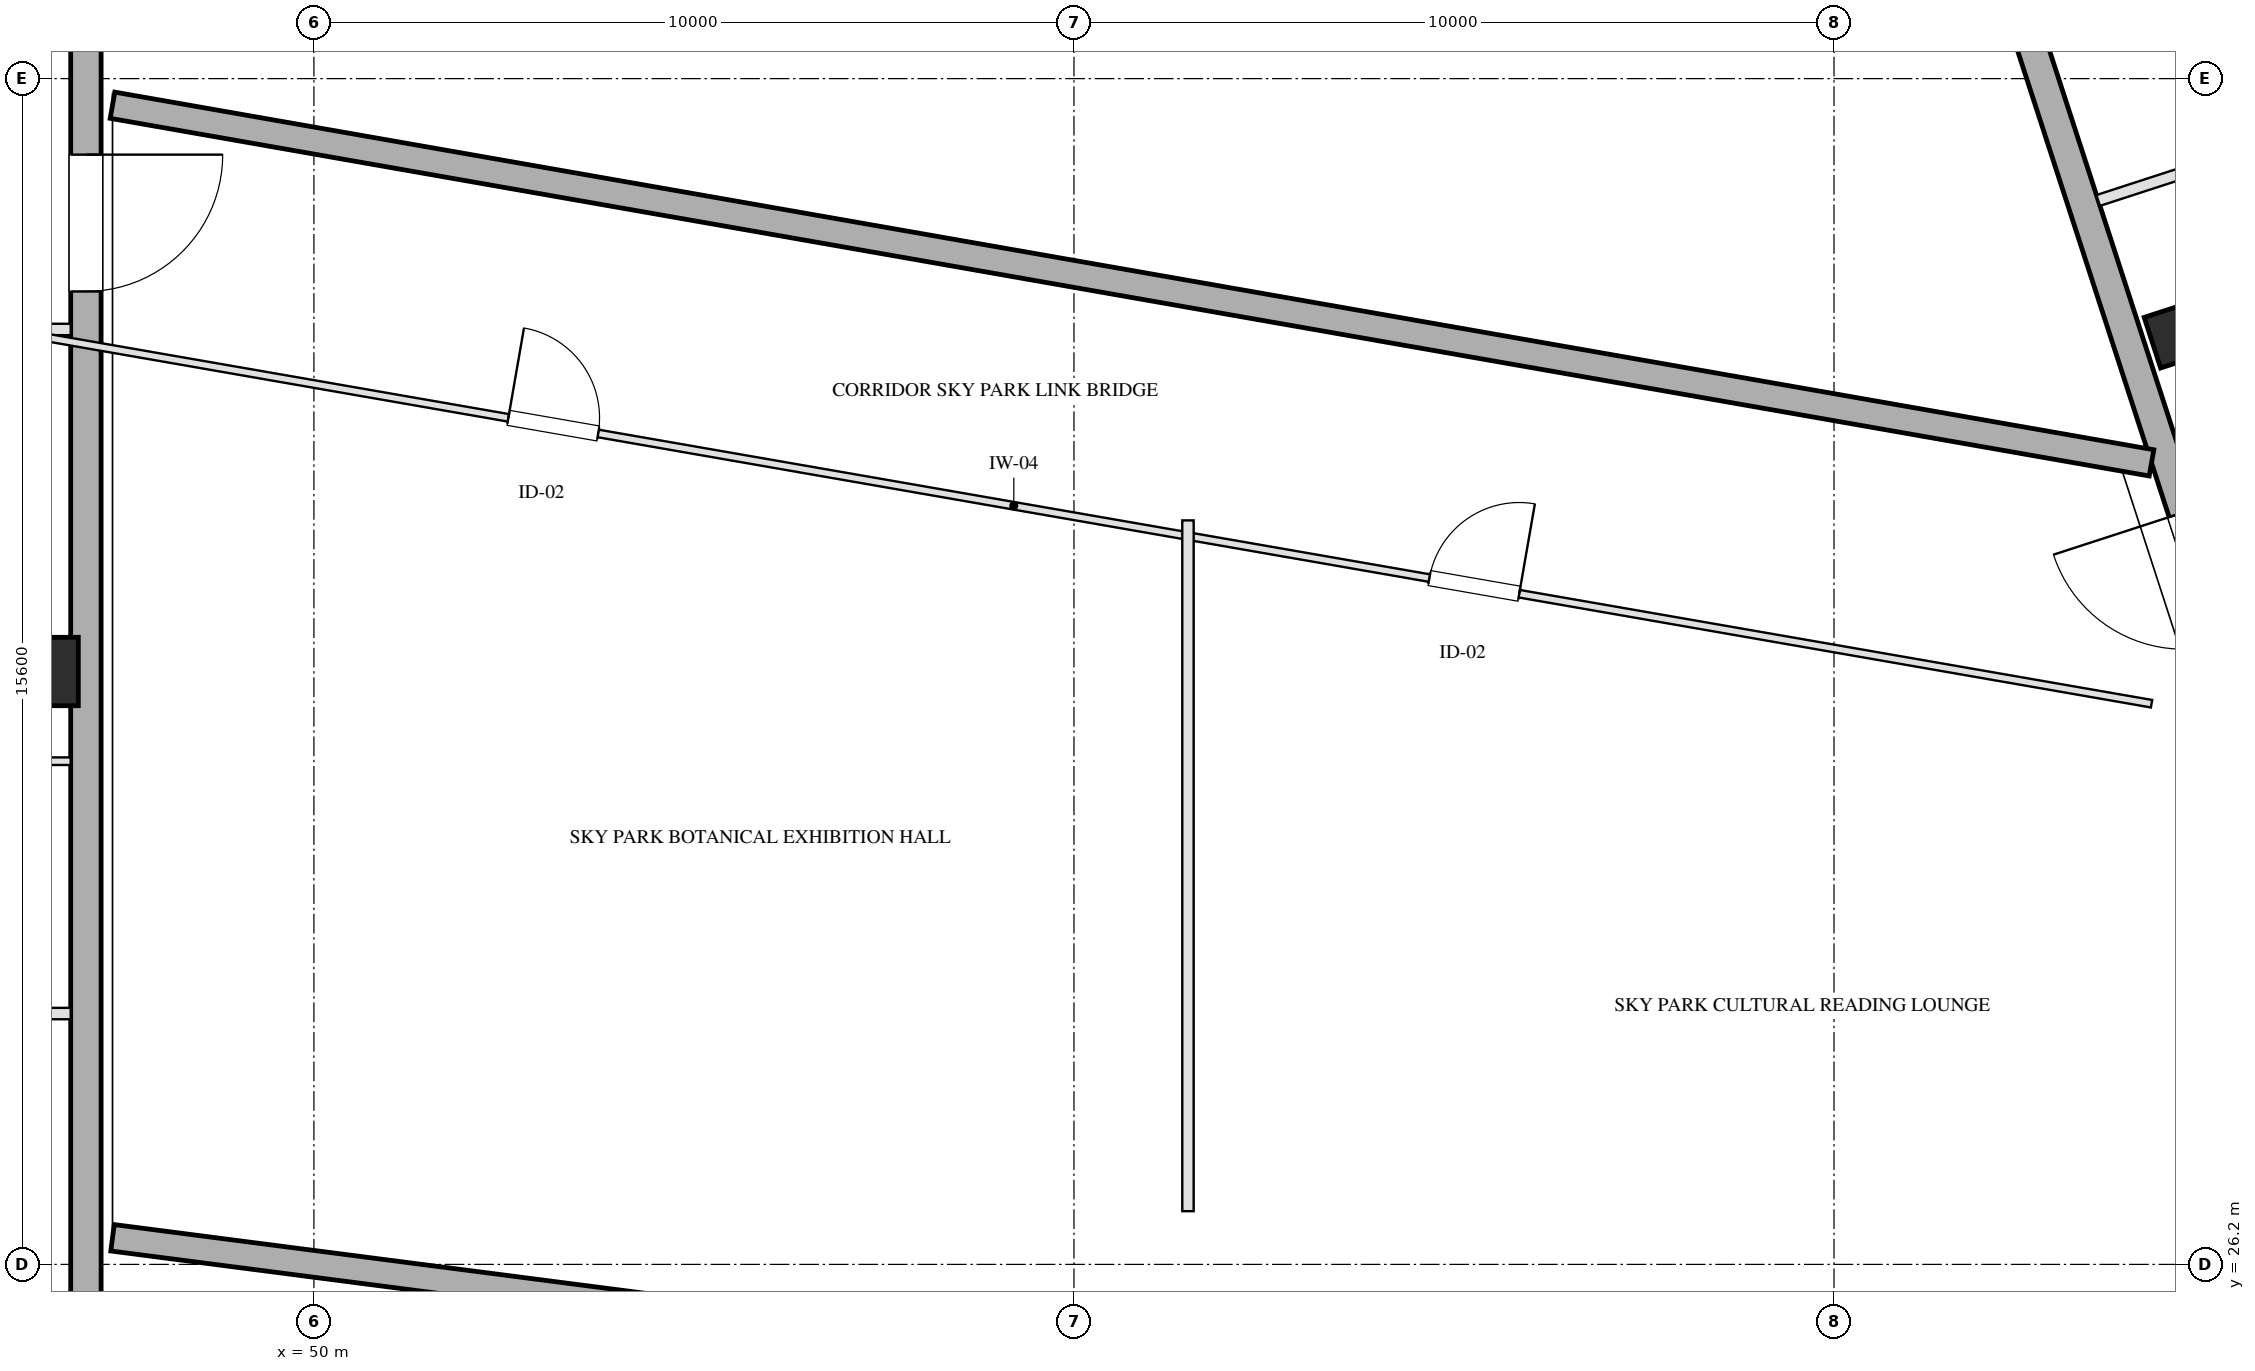
"""IFC4 building model, lengths in metres.
Left out: names, types, materials, properties, quantities, classifications, styles, units other than length and angle.
Written with IfcOpenShell. Run it as: python <this file> out.ifc"""

import sys

from ifc_helpers import new_model, si_unit, direction, frame, frame_2d, origin, origin_2d, place, context, subcontext, project, spatial, rectangle, hollow_rectangle, extrude, element, fill, save


model = new_model("IFC4")
c1 = context("Model", 3, precision=1e-05, world=origin(), true_north=direction((0.0, 1.0)))
c2 = subcontext(c1, "Body", "Model", "MODEL_VIEW")
j1 = project(units=[si_unit("LENGTHUNIT", "METRE"), si_unit("PLANEANGLEUNIT", "RADIAN")], contexts=[c1])
p1 = place(None, origin())
s1 = spatial("IfcSite", under=j1, at=p1, CompositionType="ELEMENT")
p2 = place(p1, origin())
s2 = spatial("IfcBuilding", under=s1, at=p2, CompositionType="ELEMENT")
p3 = place(p2, frame((0.0, 0.0, 216.2)))
s3 = spatial("IfcBuildingStorey", under=s2, at=p3, CompositionType="ELEMENT", Elevation=216.2)
p4 = place(p3, frame((46.45, 34.0, 0.0), z_axis=(0.0, 0.0, 1.0), x_axis=(1.0, 0.0, 0.0)))
e1 = element("IfcColumn", 1, at=p4, inside=s3, PredefinedType="COLUMN", context=c2, shape_type="SweptSolid", body=[
    extrude(hollow_rectangle(XDim=0.9, YDim=0.9, WallThickness=0.032, at=origin_2d()), origin(), (0.0, 0.0, 1.0), 3.451),
])
p5 = place(p3, frame((74.427, 38.403, 0.0), z_axis=(0.0, 0.0, 1.0), x_axis=(0.951056516295, 0.309016994375, 0.0)))
e2 = element("IfcColumn", 2, at=p5, inside=s3, PredefinedType="COLUMN", context=c2, shape_type="SweptSolid", body=[
    extrude(hollow_rectangle(XDim=0.5, YDim=0.7, WallThickness=0.025, at=origin_2d()), origin(), (0.0, 0.0, 1.0), 3.451),
])
p6 = place(p3, frame((47.0, 57.2, 0.0), z_axis=(0.0, 0.0, 1.0), x_axis=(0.0, -1.0, 0.0)))
e3 = element("IfcWall", 3, at=p6, inside=s3, PredefinedType="SOLIDWALL", context=c2, shape_type="SweptSolid", body=[
    extrude(rectangle(XDim=46.4, YDim=0.4, at=frame_2d((23.2, 0.0))), origin(), (0.0, 0.0, 1.0), 2.55),
])
p7 = place(p6, frame((16.4, 0.0, 0.0)))
e4 = element("IfcOpeningElement", 4, at=p7, cuts=e3, PredefinedType="OPENING", context=c2, shape_type="SweptSolid", body=[
    extrude(rectangle(XDim=1.8, YDim=2.2, at=frame_2d((0.9, 1.1))), frame((0.0, 0.21, 0.0), z_axis=(0.0, -1.0, 0.0), x_axis=(1.0, 0.0, 0.0)), (0.0, 0.0, 1.0), 0.42),
])
p8 = place(p3, frame((82.618, 11.414, 0.0), z_axis=(0.0, 0.0, 1.0), x_axis=(-0.309016491071, 0.951056679828, 0.0)))
e5 = element("IfcWall", 5, at=p8, inside=s3, PredefinedType="SOLIDWALL", context=c2, shape_type="SweptSolid", body=[
    extrude(rectangle(XDim=38.4, YDim=0.4, at=frame_2d((19.2, 0.0))), origin(), (0.0, 0.0, 1.0), 2.55),
])
p9 = place(p8, frame((24.15, 0.0, 0.0)))
e6 = element("IfcOpeningElement", 6, at=p9, cuts=e5, PredefinedType="OPENING", context=c2, shape_type="SweptSolid", body=[
    extrude(rectangle(XDim=1.8, YDim=2.2, at=frame_2d((0.9, 1.1))), frame((0.0, 0.21, 0.0), z_axis=(0.0, -1.0, 0.0), x_axis=(1.0, 0.0, 0.0)), (0.0, 0.0, 1.0), 0.42),
])
p10 = place(p3, frame((47.35, 26.55, 0.0), z_axis=(0.0, 0.0, 1.0), x_axis=(0.991732402874, -0.128323189996, 0.0)))
e7 = element("IfcWall", 7, at=p10, inside=s3, PredefinedType="SOLIDWALL", context=c2, shape_type="SweptSolid", body=[
    extrude(rectangle(XDim=31.725, YDim=0.35, at=frame_2d((15.862, 0.0))), origin(), (0.0, 0.0, 1.0), 3.15),
])
p11 = place(p3, frame((74.177, 36.745, 0.0), z_axis=(0.0, 0.0, 1.0), x_axis=(-0.984966283934, 0.172746691759, 0.0)))
e8 = element("IfcWall", 8, at=p11, inside=s3, PredefinedType="SOLIDWALL", context=c2, shape_type="SweptSolid", body=[
    extrude(rectangle(XDim=27.237, YDim=0.35, at=frame_2d((13.618, 0.0))), origin(), (0.0, 0.0, 1.0), 3.15),
])
p12 = place(p3, frame((28.425, 29.5, 0.0), z_axis=(0.0, 0.0, 1.0), x_axis=(1.0, 0.0, 0.0)))
e9 = element("IfcWall", 9, at=p12, inside=s3, PredefinedType="PARTITIONING", context=c2, shape_type="SweptSolid", body=[
    extrude(rectangle(XDim=18.375, YDim=0.15, at=frame_2d((9.188, 0.0))), origin(), (0.0, 0.0, 1.0), 3.155),
])
p13 = place(p12, frame((10.725, 0.0, 0.0)))
e10 = element("IfcOpeningElement", 10, at=p13, cuts=e9, PredefinedType="OPENING", context=c2, shape_type="SweptSolid", body=[
    extrude(rectangle(XDim=1.0, YDim=2.05, at=frame_2d((0.5, 1.025))), frame((0.0, 0.085, 0.0), z_axis=(0.0, -1.0, 0.0), x_axis=(1.0, 0.0, 0.0)), (0.0, 0.0, 1.0), 0.17),
])
p14 = place(p3, frame((28.425, 38.5, 0.0), z_axis=(0.0, 0.0, 1.0), x_axis=(1.0, 0.0, 0.0)))
e11 = element("IfcWall", 11, at=p14, inside=s3, PredefinedType="PARTITIONING", context=c2, shape_type="SweptSolid", body=[
    extrude(rectangle(XDim=18.375, YDim=0.15, at=frame_2d((9.188, 0.0))), origin(), (0.0, 0.0, 1.0), 3.155),
])
p15 = place(p3, frame((28.425, 32.82, 0.0), z_axis=(0.0, 0.0, 1.0), x_axis=(1.0, 0.0, 0.0)))
e12 = element("IfcWall", 12, at=p15, inside=s3, PredefinedType="MOVABLE", context=c2, shape_type="SweptSolid", body=[
    extrude(rectangle(XDim=18.375, YDim=0.1, at=frame_2d((9.188, 0.0))), origin(), (0.0, 0.0, 1.0), 3.155),
])
p16 = place(p3, frame((73.476, 40.197, 0.0), z_axis=(0.0, 0.0, 1.0), x_axis=(0.951059431056, 0.309008023519, 0.0)))
e13 = element("IfcWall", 13, at=p16, inside=s3, PredefinedType="PARTITIONING", context=c2, shape_type="SweptSolid", body=[
    extrude(rectangle(XDim=5.8, YDim=0.15, at=frame_2d((2.9, 0.0))), origin(), (0.0, 0.0, 1.0), 3.155),
])
p17 = place(p16, frame((2.436, 0.0, 0.0)))
e14 = element("IfcOpeningElement", 14, at=p17, cuts=e13, PredefinedType="OPENING", context=c2, shape_type="SweptSolid", body=[
    extrude(rectangle(XDim=1.0, YDim=2.05, at=frame_2d((0.5, 1.025))), frame((0.0, 0.085, 0.0), z_axis=(0.0, -1.0, 0.0), x_axis=(1.0, 0.0, 0.0)), (0.0, 0.0, 1.0), 0.17),
])
p18 = place(p3, frame((46.45, 38.4, 0.0), z_axis=(0.0, 0.0, 1.0), x_axis=(0.985202712742, -0.171393158571, 0.0)))
e15 = element("IfcWall", 15, at=p18, inside=s3, PredefinedType="MOVABLE", context=c2, shape_type="SweptSolid", body=[
    extrude(rectangle(XDim=28.144, YDim=0.1, at=frame_2d((14.072, 0.0))), origin(), (0.0, 0.0, 1.0), 3.155),
])
p19 = place(p18, frame((6.2, 0.0, 0.0)))
e16 = element("IfcOpeningElement", 16, at=p19, cuts=e15, PredefinedType="OPENING", context=c2, shape_type="SweptSolid", body=[
    extrude(rectangle(XDim=1.2, YDim=2.05, at=frame_2d((0.6, 1.025))), frame((0.0, 0.06, 0.0), z_axis=(0.0, -1.0, 0.0), x_axis=(1.0, 0.0, 0.0)), (0.0, 0.0, 1.0), 0.12),
])
p20 = place(p18, frame((18.5, 0.0, 0.0)))
e17 = element("IfcOpeningElement", 17, at=p20, cuts=e15, PredefinedType="OPENING", context=c2, shape_type="SweptSolid", body=[
    extrude(rectangle(XDim=1.2, YDim=2.05, at=frame_2d((0.6, 1.025))), frame((0.0, 0.06, 0.0), z_axis=(0.0, -1.0, 0.0), x_axis=(1.0, 0.0, 0.0)), (0.0, 0.0, 1.0), 0.12),
])
p21 = place(p3, frame((61.5, 26.9, 0.0), z_axis=(0.0, 0.0, 1.0), x_axis=(0.0, 1.0, 0.0)))
e18 = element("IfcWall", 18, at=p21, inside=s3, PredefinedType="PARTITIONING", context=c2, shape_type="SweptSolid", body=[
    extrude(rectangle(XDim=9.088, YDim=0.15, at=frame_2d((4.544, 0.0))), origin(), (0.0, 0.0, 1.0), 3.155),
])
p22 = place(p7, origin())
e19 = element("IfcDoor", 19, at=p22, inside=s3, OperationType="SINGLE_SWING_LEFT", PredefinedType="DOOR", context=c2, shape_type="SweptSolid", body=[
    extrude(rectangle(XDim=1.8, YDim=2.2, at=frame_2d((0.9, 1.1))), frame((0.0, 0.025, 0.0), z_axis=(0.0, -1.0, 0.0), x_axis=(1.0, 0.0, 0.0)), (0.0, 0.0, 1.0), 0.05),
])
fill(e4, e19)
p23 = place(p19, origin())
e20 = element("IfcDoor", 20, at=p23, inside=s3, OperationType="SINGLE_SWING_LEFT", PredefinedType="DOOR", context=c2, shape_type="SweptSolid", body=[
    extrude(rectangle(XDim=1.2, YDim=2.05, at=frame_2d((0.6, 1.025))), frame((0.0, 0.025, 0.0), z_axis=(0.0, -1.0, 0.0), x_axis=(1.0, 0.0, 0.0)), (0.0, 0.0, 1.0), 0.05),
])
fill(e16, e20)
p24 = place(p20, origin())
e21 = element("IfcDoor", 21, at=p24, inside=s3, OperationType="SINGLE_SWING_RIGHT", PredefinedType="DOOR", context=c2, shape_type="SweptSolid", body=[
    extrude(rectangle(XDim=1.2, YDim=2.05, at=frame_2d((0.6, 1.025))), frame((0.0, 0.025, 0.0), z_axis=(0.0, -1.0, 0.0), x_axis=(1.0, 0.0, 0.0)), (0.0, 0.0, 1.0), 0.05),
])
fill(e17, e21)
save(model, sys.argv[1])
